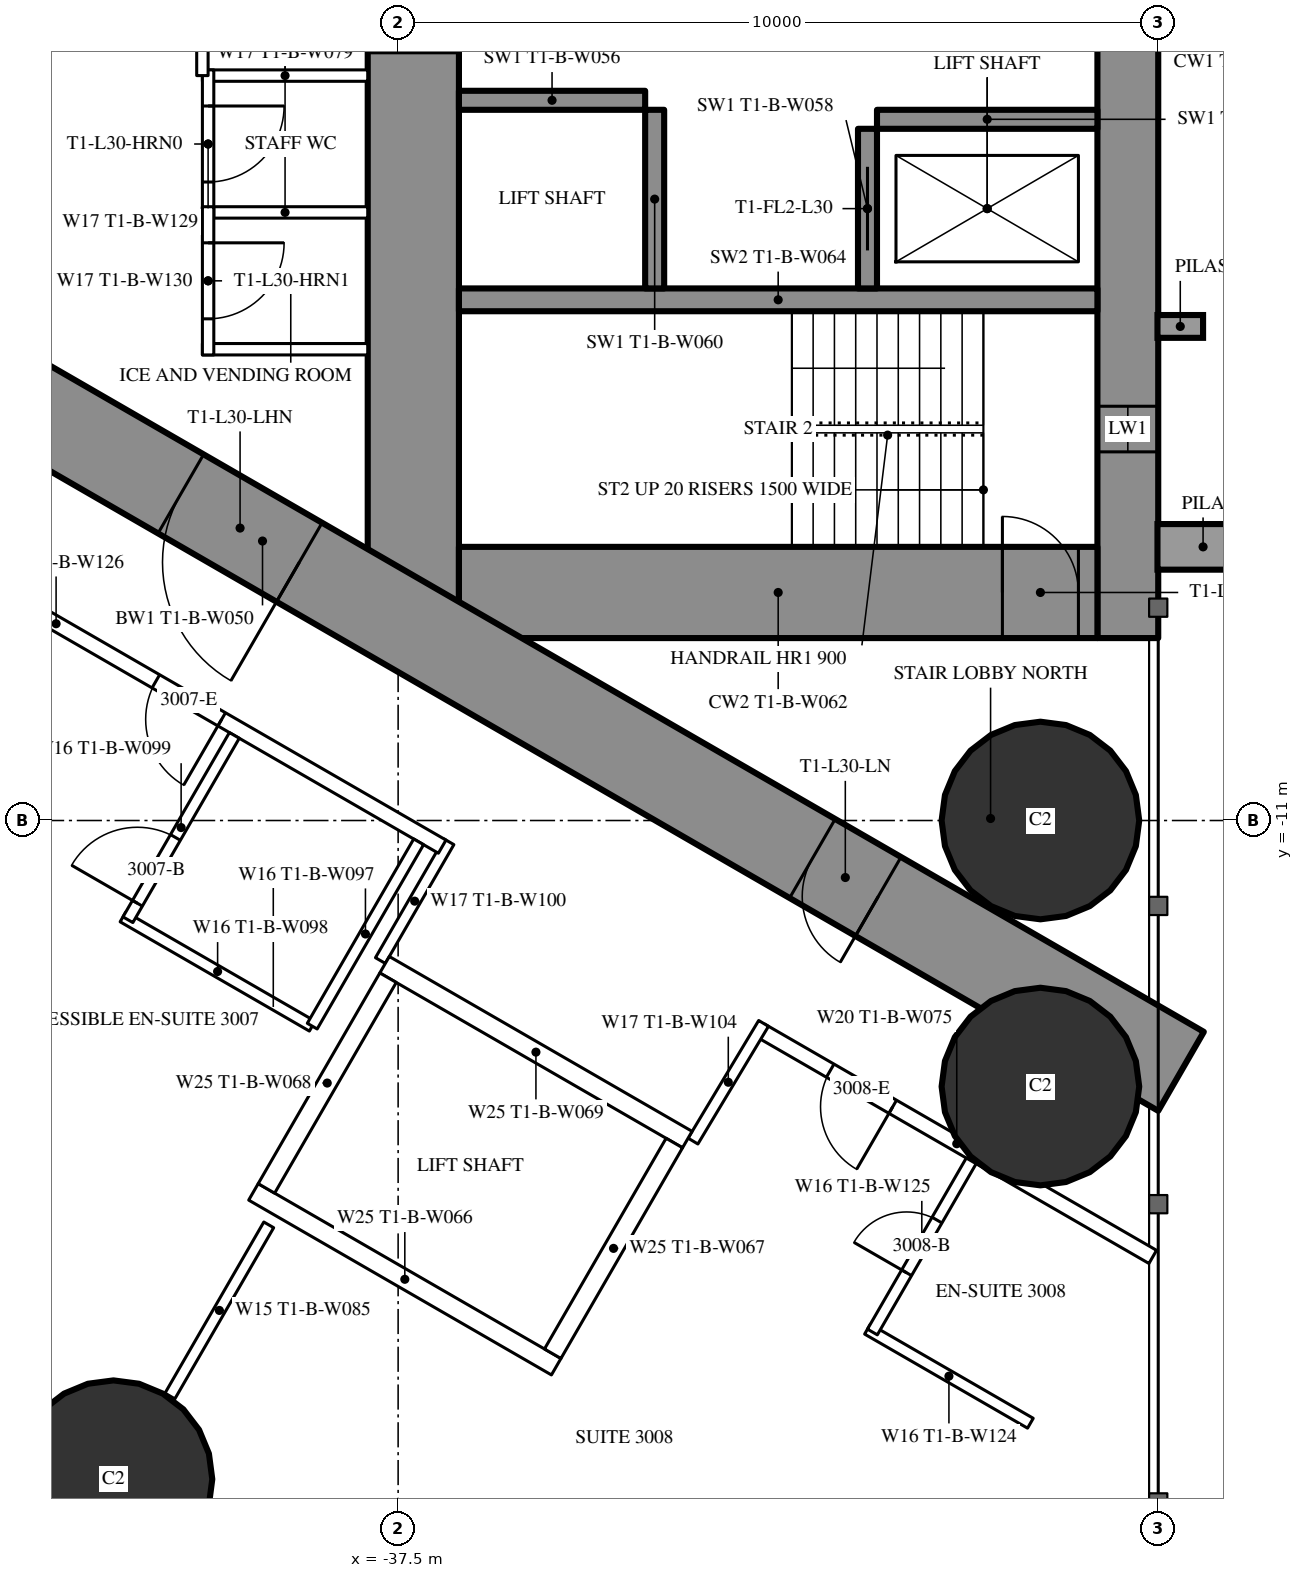
"""IFC4 building model, lengths in metres.
Left out: names, types, materials, properties, quantities, classifications, styles, units other than length and angle.
Written with IfcOpenShell. Run it as: python <this file> out.ifc"""

import sys

from ifc_helpers import new_model, si_unit, direction, frame, frame_2d, origin, origin_2d, place, context, subcontext, project, spatial, rectangle, hollow_circle, extrude, element, fill, save


model = new_model("IFC4")
c1 = context("Model", 3, precision=1e-05, world=origin(), true_north=direction((0.0, 1.0)))
c2 = subcontext(c1, "Body", "Model", "MODEL_VIEW")
j1 = project(units=[si_unit("LENGTHUNIT", "METRE"), si_unit("PLANEANGLEUNIT", "RADIAN")], contexts=[c1])
p1 = place(None, origin())
s1 = spatial("IfcSite", under=j1, at=p1, CompositionType="ELEMENT")
p2 = place(p1, origin())
s2 = spatial("IfcBuilding", under=s1, at=p2, CompositionType="ELEMENT")
p3 = place(p2, frame((0.0, 0.0, 115.1)))
s3 = spatial("IfcBuildingStorey", under=s2, at=p3, CompositionType="ELEMENT", Elevation=115.1)
for number, where, z_axis, x_axis in (
    (1, (-29.05, -11.0, 0.0), (0.0, 0.0, 1.0), (1.0, 0.0, 0.0)),
    (2, (-29.05, -14.5, 0.0), (0.0, 0.0, 1.0), (1.0, 0.0, 0.0)),
    (3, (-41.245, -19.666, 0.0), (0.0, 0.0, 1.0), (1.0, 0.0, 0.0)),
):
    element("IfcColumn", number, at=place(p3, frame(where, z_axis=z_axis, x_axis=x_axis)), inside=s3, PredefinedType="COLUMN", context=c2, shape_type="SweptSolid", body=[
        extrude(hollow_circle(Radius=1.3, WallThickness=0.1, at=origin_2d()), origin(), (0.0, 0.0, 1.0), 3.5),
    ])
p4 = place(p3, frame((-27.9, 8.6, 0.0), z_axis=(0.0, 0.0, 1.0), x_axis=(0.0, -1.0, 0.0)))
e4 = element("IfcWall", 4, at=p4, inside=s3, PredefinedType="SHEAR", context=c2, shape_type="SweptSolid", body=[
    extrude(rectangle(XDim=17.2, YDim=0.8, at=frame_2d((8.6, 0.0))), origin(), (0.0, 0.0, 1.0), 3.5),
])
p5 = place(p4, frame((2.45, 0.0, 0.6)))
e5 = element("IfcOpeningElement", 5, at=p5, cuts=e4, PredefinedType="OPENING", context=c2, shape_type="SweptSolid", body=[
    extrude(rectangle(XDim=0.6, YDim=2.1, at=frame_2d((0.3, 1.05))), frame((0.0, 0.41, 0.0), z_axis=(0.0, -1.0, 0.0), x_axis=(1.0, 0.0, 0.0)), (0.0, 0.0, 1.0), 0.82),
])
p6 = place(p4, frame((14.15, 0.0, 0.6)))
e6 = element("IfcOpeningElement", 6, at=p6, cuts=e4, PredefinedType="OPENING", context=c2, shape_type="SweptSolid", body=[
    extrude(rectangle(XDim=0.6, YDim=2.1, at=frame_2d((0.3, 1.05))), frame((0.0, 0.41, 0.0), z_axis=(0.0, -1.0, 0.0), x_axis=(1.0, 0.0, 0.0)), (0.0, 0.0, 1.0), 0.82),
])
p7 = place(p3, frame((-37.3, 8.6, 0.0), z_axis=(0.0, 0.0, 1.0), x_axis=(0.0, -1.0, 0.0)))
e7 = element("IfcWall", 7, at=p7, inside=s3, PredefinedType="SHEAR", context=c2, shape_type="SweptSolid", body=[
    extrude(rectangle(XDim=17.2, YDim=1.2, at=frame_2d((8.6, 0.0))), origin(), (0.0, 0.0, 1.0), 3.5),
])
p8 = place(p7, frame((7.7, 0.0, 0.0)))
e8 = element("IfcOpeningElement", 8, at=p8, cuts=e7, PredefinedType="OPENING", context=c2, shape_type="SweptSolid", body=[
    extrude(rectangle(XDim=1.8, YDim=2.2, at=frame_2d((0.9, 1.1))), frame((0.0, 0.61, 0.0), z_axis=(0.0, -1.0, 0.0), x_axis=(1.0, 0.0, 0.0)), (0.0, 0.0, 1.0), 1.22),
])
p9 = place(p3, frame((-28.3, -8.0, 0.0), z_axis=(0.0, 0.0, 1.0), x_axis=(-1.0, 0.0, 0.0)))
e9 = element("IfcWall", 9, at=p9, inside=s3, PredefinedType="SHEAR", context=c2, shape_type="SweptSolid", body=[
    extrude(rectangle(XDim=8.4, YDim=1.2, at=frame_2d((4.2, 0.0))), origin(), (0.0, 0.0, 1.0), 3.5),
])
p10 = place(p9, frame((0.25, 0.0, 0.0)))
e10 = element("IfcOpeningElement", 10, at=p10, cuts=e9, PredefinedType="OPENING", context=c2, shape_type="SweptSolid", body=[
    extrude(rectangle(XDim=1.0, YDim=2.2, at=frame_2d((0.5, 1.1))), frame((0.0, 0.61, 0.0), z_axis=(0.0, -1.0, 0.0), x_axis=(1.0, 0.0, 0.0)), (0.0, 0.0, 1.0), 1.22),
])
p11 = place(p3, frame((-28.3, -4.15, 0.0), z_axis=(0.0, 0.0, 1.0), x_axis=(-1.0, 0.0, 0.0)))
e11 = element("IfcWall", 11, at=p11, inside=s3, PredefinedType="SHEAR", context=c2, shape_type="SweptSolid", body=[
    extrude(rectangle(XDim=8.4, YDim=0.3, at=frame_2d((4.2, 0.0))), origin(), (0.0, 0.0, 1.0), 3.5),
])
p12 = place(p3, frame((-31.325, -1.9, 0.0), z_axis=(0.0, 0.0, 1.0), x_axis=(0.0, -1.0, 0.0)))
e12 = element("IfcWall", 12, at=p12, inside=s3, PredefinedType="SHEAR", context=c2, shape_type="SweptSolid", body=[
    extrude(rectangle(XDim=2.1, YDim=0.25, at=frame_2d((1.05, 0.0))), origin(), (0.0, 0.0, 1.0), 3.5),
])
p13 = place(p12, frame((0.5, 0.0, 0.0)))
e13 = element("IfcOpeningElement", 13, at=p13, cuts=e12, PredefinedType="OPENING", context=c2, shape_type="SweptSolid", body=[
    extrude(rectangle(XDim=1.1, YDim=2.2, at=frame_2d((0.55, 1.1))), frame((0.0, 0.135, 0.0), z_axis=(0.0, -1.0, 0.0), x_axis=(1.0, 0.0, 0.0)), (0.0, 0.0, 1.0), 0.27),
])
p14 = place(p3, frame((-34.125, -1.65, 0.0), z_axis=(0.0, 0.0, 1.0), x_axis=(0.0, -1.0, 0.0)))
e14 = element("IfcWall", 14, at=p14, inside=s3, PredefinedType="SHEAR", context=c2, shape_type="SweptSolid", body=[
    extrude(rectangle(XDim=2.35, YDim=0.25, at=frame_2d((1.175, 0.0))), origin(), (0.0, 0.0, 1.0), 3.5),
])
p15 = place(p3, frame((-28.3, -1.775, 0.0), z_axis=(0.0, 0.0, 1.0), x_axis=(-1.0, 0.0, 0.0)))
e15 = element("IfcWall", 15, at=p15, inside=s3, PredefinedType="SHEAR", context=c2, shape_type="SweptSolid", body=[
    extrude(rectangle(XDim=2.9, YDim=0.25, at=frame_2d((1.45, 0.0))), origin(), (0.0, 0.0, 1.0), 3.5),
])
p16 = place(p3, frame((-34.25, -1.525, 0.0), z_axis=(0.0, 0.0, 1.0), x_axis=(-1.0, 0.0, 0.0)))
e16 = element("IfcWall", 16, at=p16, inside=s3, PredefinedType="SHEAR", context=c2, shape_type="SweptSolid", body=[
    extrude(rectangle(XDim=2.45, YDim=0.25, at=frame_2d((1.225, 0.0))), origin(), (0.0, 0.0, 1.0), 3.5),
])
p17 = place(p3, frame((-27.2, -14.3, 0.0), z_axis=(0.0, 0.0, 1.0), x_axis=(-0.866024021859, 0.500002393557, 0.0)))
e17 = element("IfcWall", 17, at=p17, inside=s3, PredefinedType="SHEAR", context=c2, shape_type="SweptSolid", body=[
    extrude(rectangle(XDim=27.907, YDim=1.2, at=frame_2d((13.954, 0.0))), origin(), (0.0, 0.0, 1.0), 3.5),
])
p18 = place(p17, frame((4.6, 0.0, 0.0)))
e18 = element("IfcOpeningElement", 18, at=p18, cuts=e17, PredefinedType="OPENING", context=c2, shape_type="SweptSolid", body=[
    extrude(rectangle(XDim=1.0, YDim=2.2, at=frame_2d((0.5, 1.1))), frame((0.0, 0.61, 0.0), z_axis=(0.0, -1.0, 0.0), x_axis=(1.0, 0.0, 0.0)), (0.0, 0.0, 1.0), 1.22),
])
p19 = place(p17, frame((13.395, 0.0, 0.0)))
e19 = element("IfcOpeningElement", 19, at=p19, cuts=e17, PredefinedType="OPENING", context=c2, shape_type="SweptSolid", body=[
    extrude(rectangle(XDim=1.8, YDim=2.2, at=frame_2d((0.9, 1.1))), frame((0.0, 0.61, 0.0), z_axis=(0.0, -1.0, 0.0), x_axis=(1.0, 0.0, 0.0)), (0.0, 0.0, 1.0), 1.22),
])
p20 = place(p3, frame((-39.202, -16.32, 0.0), z_axis=(0.0, 0.0, 1.0), x_axis=(-0.49997716683, -0.86603858612, 0.0)))
e20 = element("IfcWall", 20, at=p20, inside=s3, PredefinedType="PARTITIONING", context=c2, shape_type="SweptSolid", body=[
    extrude(rectangle(XDim=2.6, YDim=0.15, at=frame_2d((1.3, 0.0))), origin(), (0.0, 0.0, 1.0), 3.25),
])
p21 = place(p3, frame((-27.572, -16.741, 0.0), z_axis=(0.0, 0.0, 1.0), x_axis=(-0.866024464444, 0.500001626982, 0.0)))
e21 = element("IfcWall", 21, at=p21, inside=s3, PredefinedType="PARTITIONING", context=c2, shape_type="SweptSolid", body=[
    extrude(rectangle(XDim=5.955, YDim=0.2, at=frame_2d((2.978, 0.0))), origin(), (0.0, 0.0, 1.0), 3.25),
])
p22 = place(p21, frame((3.95, 0.0, 0.0)))
e22 = element("IfcOpeningElement", 22, at=p22, cuts=e21, PredefinedType="OPENING", context=c2, shape_type="SweptSolid", body=[
    extrude(rectangle(XDim=0.95, YDim=2.2, at=frame_2d((0.475, 1.1))), frame((0.0, 0.11, 0.0), z_axis=(0.0, -1.0, 0.0), x_axis=(1.0, 0.0, 0.0)), (0.0, 0.0, 1.0), 0.22),
])
p23 = place(p3, frame((-36.831, -11.28, 0.0), z_axis=(0.0, 0.0, 1.0), x_axis=(-0.499937177781, -0.866061671171, 0.0)))
e23 = element("IfcWall", 23, at=p23, inside=s3, PredefinedType="PARTITIONING", context=c2, shape_type="SweptSolid", body=[
    extrude(rectangle(XDim=1.804, YDim=0.15, at=frame_2d((0.902, 0.0))), origin(), (0.0, 0.0, 1.0), 3.25),
])
p24 = place(p3, frame((-33.621, -15.218, 0.0), z_axis=(0.0, 0.0, 1.0), x_axis=(0.514336634837, 0.857588377991, 0.0)))
e24 = element("IfcWall", 24, at=p24, inside=s3, PredefinedType="PARTITIONING", context=c2, shape_type="SweptSolid", body=[
    extrude(rectangle(XDim=1.805, YDim=0.15, at=frame_2d((0.903, 0.0))), origin(), (0.0, 0.0, 1.0), 3.25),
])
p25 = place(p3, frame((-36.92, -11.344, 0.0), z_axis=(0.0, 0.0, 1.0), x_axis=(-0.866027897759, 0.499995680284, 0.0)))
e25 = element("IfcWall", 25, at=p25, inside=s3, PredefinedType="PARTITIONING", context=c2, shape_type="SweptSolid", body=[
    extrude(rectangle(XDim=11.731, YDim=0.2, at=frame_2d((5.865, 0.0))), origin(), (0.0, 0.0, 1.0), 3.25),
])
p26 = place(p25, frame((3.35, 0.0, 0.0)))
e26 = element("IfcOpeningElement", 26, at=p26, cuts=e25, PredefinedType="OPENING", context=c2, shape_type="SweptSolid", body=[
    extrude(rectangle(XDim=1.0, YDim=2.2, at=frame_2d((0.5, 1.1))), frame((0.0, 0.11, 0.0), z_axis=(0.0, -1.0, 0.0), x_axis=(1.0, 0.0, 0.0)), (0.0, 0.0, 1.0), 0.22),
])
p27 = place(p3, frame((-38.63, -13.705, 0.0), z_axis=(0.0, 0.0, 1.0), x_axis=(-0.866018712932, 0.500011588718, 0.0)))
e27 = element("IfcWall", 27, at=p27, inside=s3, PredefinedType="PARTITIONING", context=c2, shape_type="SweptSolid", body=[
    extrude(rectangle(XDim=2.875, YDim=0.15, at=frame_2d((1.438, 0.0))), origin(), (0.0, 0.0, 1.0), 3.25),
])
p28 = place(p3, frame((-39.655, -9.88, 0.0), z_axis=(0.0, 0.0, 1.0), x_axis=(-0.500049511043, -0.865996816683, 0.0)))
e28 = element("IfcWall", 28, at=p28, inside=s3, PredefinedType="PARTITIONING", context=c2, shape_type="SweptSolid", body=[
    extrude(rectangle(XDim=2.8, YDim=0.15, at=frame_2d((1.4, 0.0))), origin(), (0.0, 0.0, 1.0), 3.25),
])
p29 = place(p28, frame((1.55, 0.0, 0.0)))
e29 = element("IfcOpeningElement", 29, at=p29, cuts=e28, PredefinedType="OPENING", context=c2, shape_type="SweptSolid", body=[
    extrude(rectangle(XDim=1.0, YDim=2.2, at=frame_2d((0.5, 1.1))), frame((0.0, 0.085, 0.0), z_axis=(0.0, -1.0, 0.0), x_axis=(1.0, 0.0, 0.0)), (0.0, 0.0, 1.0), 0.17),
])
p30 = place(p3, frame((-37.23, -11.281, 0.0), z_axis=(0.0, 0.0, 1.0), x_axis=(-0.500049511043, -0.865996816683, 0.0)))
e30 = element("IfcWall", 30, at=p30, inside=s3, PredefinedType="PARTITIONING", context=c2, shape_type="SweptSolid", body=[
    extrude(rectangle(XDim=2.8, YDim=0.15, at=frame_2d((1.4, 0.0))), origin(), (0.0, 0.0, 1.0), 3.25),
])
p31 = place(p3, frame((-29.182, -18.929, 0.0), z_axis=(0.0, 0.0, 1.0), x_axis=(-0.866006523861, 0.500032699561, 0.0)))
e31 = element("IfcWall", 31, at=p31, inside=s3, PredefinedType="PARTITIONING", context=c2, shape_type="SweptSolid", body=[
    extrude(rectangle(XDim=2.475, YDim=0.15, at=frame_2d((1.237, 0.0))), origin(), (0.0, 0.0, 1.0), 3.25),
])
p32 = place(p3, frame((-29.96, -15.478, 0.0), z_axis=(0.0, 0.0, 1.0), x_axis=(-0.500006934395, -0.866021400173, 0.0)))
e32 = element("IfcWall", 32, at=p32, inside=s3, PredefinedType="PARTITIONING", context=c2, shape_type="SweptSolid", body=[
    extrude(rectangle(XDim=2.6, YDim=0.15, at=frame_2d((1.3, 0.0))), origin(), (0.0, 0.0, 1.0), 3.25),
])
p33 = place(p32, frame((0.9, 0.0, 0.0)))
e33 = element("IfcOpeningElement", 33, at=p33, cuts=e32, PredefinedType="OPENING", context=c2, shape_type="SweptSolid", body=[
    extrude(rectangle(XDim=0.8, YDim=2.2, at=frame_2d((0.4, 1.1))), frame((0.0, 0.085, 0.0), z_axis=(0.0, -1.0, 0.0), x_axis=(1.0, 0.0, 0.0)), (0.0, 0.0, 1.0), 0.17),
])
for number, where, z_axis, x_axis in (
    (34, (-37.9, -1.2, 0.0), (0.0, 0.0, 1.0), (-1.0, 0.0, 0.0)),
    (35, (-37.9, -3.0, 0.0), (0.0, 0.0, 1.0), (-1.0, 0.0, 0.0)),
    (36, (-37.9, -4.8, 0.0), (0.0, 0.0, 1.0), (-1.0, 0.0, 0.0)),
):
    element("IfcWall", number, at=place(p3, frame(where, z_axis=z_axis, x_axis=x_axis)), inside=s3, PredefinedType="PARTITIONING", context=c2, shape_type="SweptSolid", body=[
        extrude(rectangle(XDim=2.175, YDim=0.15, at=frame_2d((1.087, 0.0))), origin(), (0.0, 0.0, 1.0), 3.25),
    ])
p34 = place(p3, frame((-40.0, -1.125, 0.0), z_axis=(0.0, 0.0, 1.0), x_axis=(0.0, -1.0, 0.0)))
e37 = element("IfcWall", 37, at=p34, inside=s3, PredefinedType="PARTITIONING", context=c2, shape_type="SweptSolid", body=[
    extrude(rectangle(XDim=1.95, YDim=0.15, at=frame_2d((0.975, 0.0))), origin(), (0.0, 0.0, 1.0), 3.25),
])
p35 = place(p34, frame((0.475, 0.0, 0.0)))
e38 = element("IfcOpeningElement", 38, at=p35, cuts=e37, PredefinedType="OPENING", context=c2, shape_type="SweptSolid", body=[
    extrude(rectangle(XDim=1.0, YDim=2.2, at=frame_2d((0.5, 1.1))), frame((0.0, 0.085, 0.0), z_axis=(0.0, -1.0, 0.0), x_axis=(1.0, 0.0, 0.0)), (0.0, 0.0, 1.0), 0.17),
])
p36 = place(p3, frame((-40.0, -2.925, 0.0), z_axis=(0.0, 0.0, 1.0), x_axis=(0.0, -1.0, 0.0)))
e39 = element("IfcWall", 39, at=p36, inside=s3, PredefinedType="PARTITIONING", context=c2, shape_type="SweptSolid", body=[
    extrude(rectangle(XDim=1.95, YDim=0.15, at=frame_2d((0.975, 0.0))), origin(), (0.0, 0.0, 1.0), 3.25),
])
p37 = place(p36, frame((0.475, 0.0, 0.0)))
e40 = element("IfcOpeningElement", 40, at=p37, cuts=e39, PredefinedType="OPENING", context=c2, shape_type="SweptSolid", body=[
    extrude(rectangle(XDim=1.0, YDim=2.2, at=frame_2d((0.5, 1.1))), frame((0.0, 0.085, 0.0), z_axis=(0.0, -1.0, 0.0), x_axis=(1.0, 0.0, 0.0)), (0.0, 0.0, 1.0), 0.17),
])
p38 = place(p3, frame((-40.075, 6.174, 0.0), z_axis=(0.0, 0.0, 1.0), x_axis=(0.0, -1.0, 0.0)))
e41 = element("IfcWall", 41, at=p38, inside=s3, PredefinedType="PARTITIONING", context=c2, shape_type="SweptSolid", body=[
    extrude(rectangle(XDim=7.374, YDim=0.15, at=frame_2d((3.687, 0.0))), origin(), (0.0, 0.0, 1.0), 3.25),
])
p39 = place(p38, frame((2.787, 0.0, 0.0)))
e42 = element("IfcOpeningElement", 42, at=p39, cuts=e41, PredefinedType="OPENING", context=c2, shape_type="SweptSolid", body=[
    extrude(rectangle(XDim=1.8, YDim=2.2, at=frame_2d((0.9, 1.1))), frame((0.0, 0.085, 0.0), z_axis=(0.0, -1.0, 0.0), x_axis=(1.0, 0.0, 0.0)), (0.0, 0.0, 1.0), 0.17),
])
p40 = place(p3, frame((-33.696, -15.197, 0.0), z_axis=(0.0, 0.0, 1.0), x_axis=(-0.865976953817, 0.500083908417, 0.0)))
e43 = element("IfcWall", 43, at=p40, inside=s3, PredefinedType="PARTITIONING", context=c2, shape_type="SweptSolid", body=[
    extrude(rectangle(XDim=4.599, YDim=0.25, at=frame_2d((2.3, 0.0))), origin(), (0.0, 0.0, 1.0), 3.25),
])
p41 = place(p3, frame((-35.42, -18.186, 0.0), z_axis=(0.0, 0.0, 1.0), x_axis=(-0.865990227814, 0.50006092162, 0.0)))
e44 = element("IfcWall", 44, at=p41, inside=s3, PredefinedType="PARTITIONING", context=c2, shape_type="SweptSolid", body=[
    extrude(rectangle(XDim=4.6, YDim=0.25, at=frame_2d((2.3, 0.0))), origin(), (0.0, 0.0, 1.0), 3.25),
])
p42 = place(p3, frame((-33.866, -15.243, 0.0), z_axis=(0.0, 0.0, 1.0), x_axis=(-0.499929347863, -0.866066190972, 0.0)))
e45 = element("IfcWall", 45, at=p42, inside=s3, PredefinedType="PARTITIONING", context=c2, shape_type="SweptSolid", body=[
    extrude(rectangle(XDim=3.201, YDim=0.25, at=frame_2d((1.6, 0.0))), origin(), (0.0, 0.0, 1.0), 3.25),
])
p43 = place(p3, frame((-37.633, -13.068, 0.0), z_axis=(0.0, 0.0, 1.0), x_axis=(-0.499872130319, -0.866099216793, 0.0)))
e46 = element("IfcWall", 46, at=p43, inside=s3, PredefinedType="PARTITIONING", context=c2, shape_type="SweptSolid", body=[
    extrude(rectangle(XDim=3.2, YDim=0.25, at=frame_2d((1.6, 0.0))), origin(), (0.0, 0.0, 1.0), 3.25),
])
p44 = place(p29, origin())
e47 = element("IfcDoor", 47, at=p44, inside=s3, OperationType="SINGLE_SWING_RIGHT", PredefinedType="DOOR", context=c2, shape_type="SweptSolid", body=[
    extrude(rectangle(XDim=1.0, YDim=2.2, at=frame_2d((0.5, 1.1))), frame((0.0, 0.025, 0.0), z_axis=(0.0, -1.0, 0.0), x_axis=(1.0, 0.0, 0.0)), (0.0, 0.0, 1.0), 0.05),
])
fill(e29, e47)
p45 = place(p26, origin())
e48 = element("IfcDoor", 48, at=p45, inside=s3, OperationType="SINGLE_SWING_LEFT", PredefinedType="DOOR", context=c2, shape_type="SweptSolid", body=[
    extrude(rectangle(XDim=1.0, YDim=2.2, at=frame_2d((0.5, 1.1))), frame((0.0, 0.025, 0.0), z_axis=(0.0, -1.0, 0.0), x_axis=(1.0, 0.0, 0.0)), (0.0, 0.0, 1.0), 0.05),
])
fill(e26, e48)
p46 = place(p33, origin())
e49 = element("IfcDoor", 49, at=p46, inside=s3, OperationType="SINGLE_SWING_RIGHT", PredefinedType="DOOR", context=c2, shape_type="SweptSolid", body=[
    extrude(rectangle(XDim=0.8, YDim=2.2, at=frame_2d((0.4, 1.1))), frame((0.0, 0.025, 0.0), z_axis=(0.0, -1.0, 0.0), x_axis=(1.0, 0.0, 0.0)), (0.0, 0.0, 1.0), 0.05),
])
fill(e33, e49)
p47 = place(p22, origin())
e50 = element("IfcDoor", 50, at=p47, inside=s3, OperationType="SINGLE_SWING_LEFT", PredefinedType="DOOR", context=c2, shape_type="SweptSolid", body=[
    extrude(rectangle(XDim=0.95, YDim=2.2, at=frame_2d((0.475, 1.1))), frame((0.0, 0.025, 0.0), z_axis=(0.0, -1.0, 0.0), x_axis=(1.0, 0.0, 0.0)), (0.0, 0.0, 1.0), 0.05),
])
fill(e22, e50)
p48 = place(p35, origin())
e51 = element("IfcDoor", 51, at=p48, inside=s3, OperationType="SINGLE_SWING_LEFT", PredefinedType="DOOR", context=c2, shape_type="SweptSolid", body=[
    extrude(rectangle(XDim=1.0, YDim=2.2, at=frame_2d((0.5, 1.1))), frame((0.0, 0.025, 0.0), z_axis=(0.0, -1.0, 0.0), x_axis=(1.0, 0.0, 0.0)), (0.0, 0.0, 1.0), 0.05),
])
fill(e38, e51)
p49 = place(p37, origin())
e52 = element("IfcDoor", 52, at=p49, inside=s3, OperationType="SINGLE_SWING_LEFT", PredefinedType="DOOR", context=c2, shape_type="SweptSolid", body=[
    extrude(rectangle(XDim=1.0, YDim=2.2, at=frame_2d((0.5, 1.1))), frame((0.0, 0.025, 0.0), z_axis=(0.0, -1.0, 0.0), x_axis=(1.0, 0.0, 0.0)), (0.0, 0.0, 1.0), 0.05),
])
fill(e40, e52)
p50 = place(p18, origin())
e53 = element("IfcDoor", 53, at=p50, inside=s3, OperationType="SINGLE_SWING_LEFT", PredefinedType="DOOR", context=c2, shape_type="SweptSolid", body=[
    extrude(rectangle(XDim=1.0, YDim=2.2, at=frame_2d((0.5, 1.1))), frame((0.0, 0.025, 0.0), z_axis=(0.0, -1.0, 0.0), x_axis=(1.0, 0.0, 0.0)), (0.0, 0.0, 1.0), 0.05),
])
fill(e18, e53)
p51 = place(p19, origin())
e54 = element("IfcDoor", 54, at=p51, inside=s3, OperationType="DOUBLE_DOOR_SINGLE_SWING", PredefinedType="DOOR", context=c2, shape_type="SweptSolid", body=[
    extrude(rectangle(XDim=1.8, YDim=2.2, at=frame_2d((0.9, 1.1))), frame((0.0, 0.025, 0.0), z_axis=(0.0, -1.0, 0.0), x_axis=(1.0, 0.0, 0.0)), (0.0, 0.0, 1.0), 0.05),
])
fill(e19, e54)
p52 = place(p10, origin())
e55 = element("IfcDoor", 55, at=p52, inside=s3, OperationType="SINGLE_SWING_RIGHT", PredefinedType="DOOR", context=c2, shape_type="SweptSolid", body=[
    extrude(rectangle(XDim=1.0, YDim=2.2, at=frame_2d((0.5, 1.1))), frame((0.0, 0.025, 0.0), z_axis=(0.0, -1.0, 0.0), x_axis=(1.0, 0.0, 0.0)), (0.0, 0.0, 1.0), 0.05),
])
fill(e10, e55)
p53 = place(p13, origin())
e56 = element("IfcDoor", 56, at=p53, inside=s3, OperationType="SLIDING_TO_LEFT", PredefinedType="USERDEFINED", context=c2, shape_type="SweptSolid", body=[
    extrude(rectangle(XDim=1.1, YDim=2.2, at=frame_2d((0.55, 1.1))), frame((0.0, 0.025, 0.0), z_axis=(0.0, -1.0, 0.0), x_axis=(1.0, 0.0, 0.0)), (0.0, 0.0, 1.0), 0.05),
])
fill(e13, e56)
p54 = place(p6, origin())
e57 = element("IfcWindow", 57, at=p54, inside=s3, PartitioningType="SINGLE_PANEL", PredefinedType="WINDOW", context=c2, shape_type="SweptSolid", body=[
    extrude(rectangle(XDim=0.6, YDim=2.1, at=frame_2d((0.3, 1.05))), frame((0.0, 0.03, 0.0), z_axis=(0.0, -1.0, 0.0), x_axis=(1.0, 0.0, 0.0)), (0.0, 0.0, 1.0), 0.06),
])
fill(e6, e57)
save(model, sys.argv[1])
